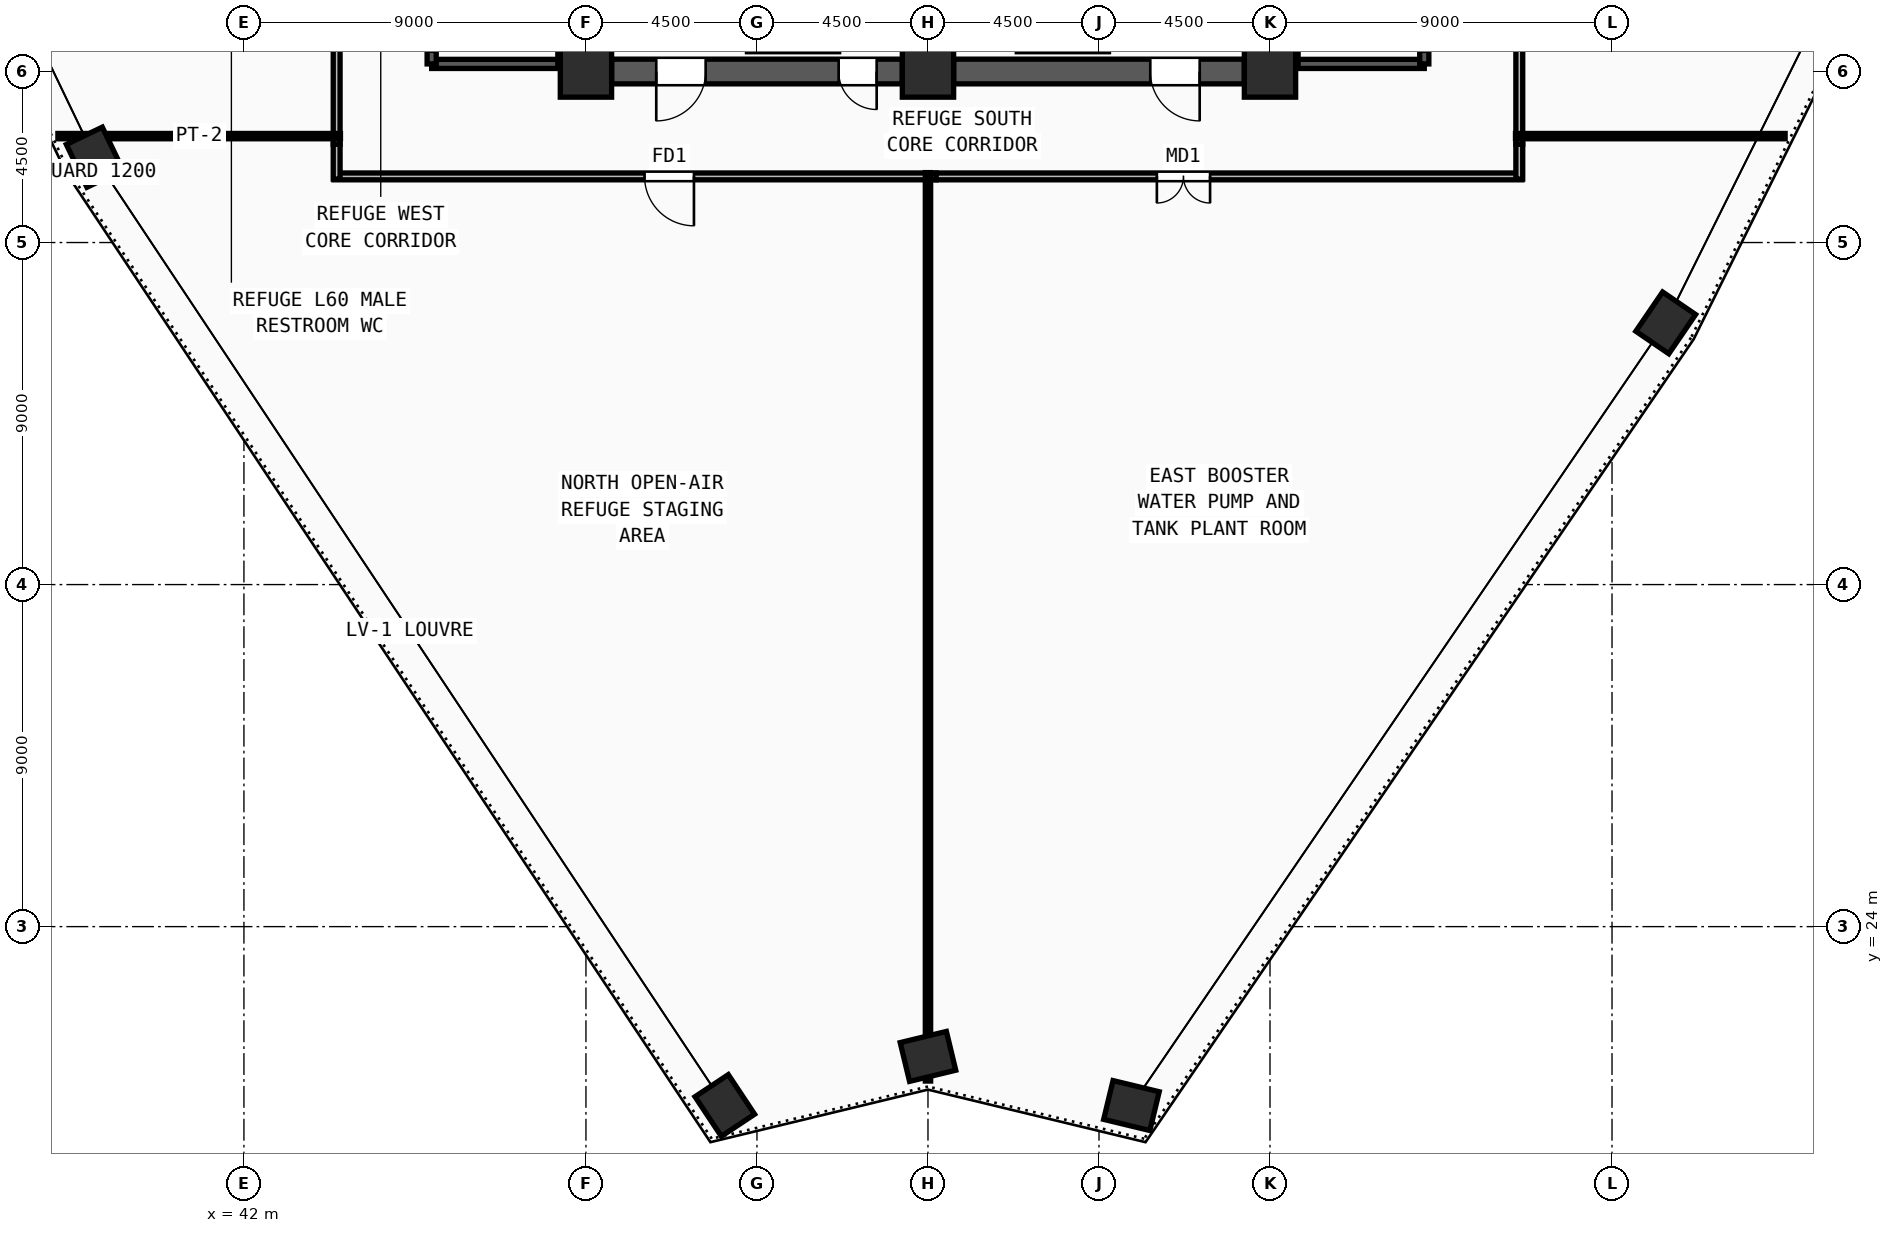
"""IFC4 building model, lengths in metres.
Left out: names, types, materials, properties, quantities, classifications, styles, units other than length and angle.
Written with IfcOpenShell. Run it as: python <this file> out.ifc"""

import sys

from ifc_helpers import new_model, si_unit, direction, frame, frame_2d, origin, origin_2d, place, context, subcontext, project, spatial, rectangle, extrude, source, transform, mapped, element, fill, save


model = new_model("IFC4")
c1 = context("Model", 3, precision=1e-05, world=origin(), true_north=direction((0.0, 1.0)))
c2 = subcontext(c1, "Body", "Model", "MODEL_VIEW")
j1 = project(units=[si_unit("LENGTHUNIT", "METRE"), si_unit("PLANEANGLEUNIT", "RADIAN")], contexts=[c1])
p1 = place(None, origin())
s1 = spatial("IfcSite", under=j1, at=p1, CompositionType="ELEMENT")
p2 = place(p1, origin())
s2 = spatial("IfcBuilding", under=s1, at=p2, CompositionType="ELEMENT")
p3 = place(p2, frame((0.0, 0.0, 231.75)))
s3 = spatial("IfcBuildingStorey", under=s2, at=p3, CompositionType="ELEMENT", Elevation=231.75)
m1 = source(origin(), c2, "Body", "SweptSolid", [
    extrude(rectangle(XDim=1.35, YDim=1.35, at=origin_2d()), origin(), (0.0, 0.0, 1.0), 4.5),
])
for number, where, z_axis, x_axis in (
    (1, (51.0, 46.5, 0.0), (0.0, 0.0, 1.0), (1.0, 0.0, 0.0)),
    (2, (60.0, 46.5, 0.0), (0.0, 0.0, 1.0), (1.0, 0.0, 0.0)),
    (3, (69.0, 46.5, 0.0), (0.0, 0.0, 1.0), (1.0, 0.0, 0.0)),
):
    element("IfcColumn", number, at=place(p3, frame(where, z_axis=z_axis, x_axis=x_axis)), inside=s3, PredefinedType="COLUMN", context=c2, shape_type="MappedRepresentation", body=[
        mapped(m1, transform((0.0, 0.0, 0.0), x_axis=(1.0, 0.0, 0.0), y_axis=(0.0, 1.0, 0.0), z_axis=(0.0, 0.0, 1.0), scale=1.0)),
    ])
m2 = source(origin(), c2, "Body", "SweptSolid", [
    extrude(rectangle(XDim=1.25, YDim=1.05, at=origin_2d()), origin(), (0.0, 0.0, 1.0), 4.5),
])
for number, where, z_axis, x_axis in (
    (4, (54.654, 19.294, 0.0), (0.0, 0.0, 1.0), (-0.554, 0.833, 0.0)),
    (5, (38.071, 44.245, 0.0), (0.0, 0.0, 1.0), (-0.433, 0.901, 0.0)),
    (6, (79.413, 39.886, 0.0), (0.0, 0.0, 1.0), (0.564, 0.826, 0.0)),
    (7, (65.354, 19.292, 0.0), (0.0, 0.0, 1.0), (-0.972, 0.235, 0.0)),
    (8, (60.0, 20.585, 0.0), (0.0, 0.0, 1.0), (0.972, 0.235, 0.0)),
):
    element("IfcColumn", number, at=place(p3, frame(where, z_axis=z_axis, x_axis=x_axis)), inside=s3, PredefinedType="COLUMN", context=c2, shape_type="MappedRepresentation", body=[
        mapped(m2, transform((0.0, 0.0, 0.0), x_axis=(1.0, 0.0, 0.0), y_axis=(0.0, 1.0, 0.0), z_axis=(0.0, 0.0, 1.0), scale=1.0)),
    ])
p4 = place(p3, frame((68.325, 46.5, 0.0), z_axis=(0.0, 0.0, 1.0), x_axis=(-1.0, 0.0, 0.0)))
e9 = element("IfcWall", 9, at=p4, inside=s3, PredefinedType="SHEAR", context=c2, shape_type="SweptSolid", body=[
    extrude(rectangle(XDim=7.65, YDim=0.65, at=frame_2d((3.825, 0.0))), origin(), (0.0, 0.0, 1.0), 4.32),
])
m3 = source(origin(), c2, "Body", "SweptSolid", [
    extrude(rectangle(XDim=1.3, YDim=2.2, at=frame_2d((0.65, 1.1))), frame((0.0, 0.335, 0.0), z_axis=(0.0, -1.0, 0.0), x_axis=(1.0, 0.0, 0.0)), (0.0, 0.0, 1.0), 0.67),
])
p5 = place(p4, frame((1.175, 0.0, 0.0)))
e10 = element("IfcOpeningElement", 10, at=p5, cuts=e9, PredefinedType="OPENING", context=c2, shape_type="MappedRepresentation", body=[
    mapped(m3, transform((0.0, 0.0, 0.0), x_axis=(1.0, 0.0, 0.0), y_axis=(0.0, 1.0, 0.0), z_axis=(0.0, 0.0, 1.0), scale=1.0)),
])
p6 = place(p3, frame((59.325, 46.5, 0.0), z_axis=(0.0, 0.0, 1.0), x_axis=(-1.0, 0.0, 0.0)))
e11 = element("IfcWall", 11, at=p6, inside=s3, PredefinedType="SHEAR", context=c2, shape_type="SweptSolid", body=[
    extrude(rectangle(XDim=7.65, YDim=0.65, at=frame_2d((3.825, 0.0))), origin(), (0.0, 0.0, 1.0), 4.32),
])
p7 = place(p6, frame((5.175, 0.0, 0.0)))
e12 = element("IfcOpeningElement", 12, at=p7, cuts=e11, PredefinedType="OPENING", context=c2, shape_type="MappedRepresentation", body=[
    mapped(m3, transform((0.0, 0.0, 0.0), x_axis=(1.0, 0.0, 0.0), y_axis=(0.0, 1.0, 0.0), z_axis=(0.0, 0.0, 1.0), scale=1.0)),
])
m4 = source(origin(), c2, "Body", "SweptSolid", [
    extrude(rectangle(XDim=1.0, YDim=2.2, at=frame_2d((0.5, 1.1))), frame((0.0, 0.335, 0.0), z_axis=(0.0, -1.0, 0.0), x_axis=(1.0, 0.0, 0.0)), (0.0, 0.0, 1.0), 0.67),
])
p8 = place(p6, frame((0.675, 0.0, 0.0)))
e13 = element("IfcOpeningElement", 13, at=p8, cuts=e11, PredefinedType="OPENING", context=c2, shape_type="MappedRepresentation", body=[
    mapped(m4, transform((0.0, 0.0, 0.0), x_axis=(1.0, 0.0, 0.0), y_axis=(0.0, 1.0, 0.0), z_axis=(0.0, 0.0, 1.0), scale=1.0)),
])
p9 = place(p3, frame((46.94, 46.7, 0.0), z_axis=(0.0, 0.0, 1.0), x_axis=(1.0, 0.0, 0.0)))
e14 = element("IfcWall", 14, at=p9, inside=s3, PredefinedType="SOLIDWALL", context=c2, shape_type="SweptSolid", body=[
    extrude(rectangle(XDim=3.44, YDim=0.24, at=frame_2d((1.72, 0.0))), origin(), (0.0, 0.0, 1.0), 4.32),
])
p10 = place(p3, frame((50.38, 46.7, 0.0), z_axis=(0.0, 0.0, 1.0), x_axis=(0.0, 1.0, 0.0)))
e15 = element("IfcWall", 15, at=p10, inside=s3, PredefinedType="SOLIDWALL", context=c2, shape_type="SweptSolid", body=[
    extrude(rectangle(XDim=7.82, YDim=0.24, at=frame_2d((3.91, 0.0))), origin(), (0.0, 0.0, 1.0), 4.32),
])
p11 = place(p3, frame((46.94, 54.52, 0.0), z_axis=(0.0, 0.0, 1.0), x_axis=(0.0, -1.0, 0.0)))
e16 = element("IfcWall", 16, at=p11, inside=s3, PredefinedType="SOLIDWALL", context=c2, shape_type="SweptSolid", body=[
    extrude(rectangle(XDim=7.82, YDim=0.24, at=frame_2d((3.91, 0.0))), origin(), (0.0, 0.0, 1.0), 4.32),
])
m5 = source(origin(), c2, "Body", "SweptSolid", [
    extrude(rectangle(XDim=1.2, YDim=2.2, at=frame_2d((0.6, 1.1))), frame((0.0, 0.13, 0.0), z_axis=(0.0, -1.0, 0.0), x_axis=(1.0, 0.0, 0.0)), (0.0, 0.0, 1.0), 0.26),
])
p12 = place(p11, frame((6.3, 0.0, 0.0)))
e17 = element("IfcOpeningElement", 17, at=p12, cuts=e16, PredefinedType="OPENING", context=c2, shape_type="MappedRepresentation", body=[
    mapped(m5, transform((0.0, 0.0, 0.0), x_axis=(1.0, 0.0, 0.0), y_axis=(0.0, 1.0, 0.0), z_axis=(0.0, 0.0, 1.0), scale=1.0)),
])
p13 = place(p3, frame((69.62, 46.7, 0.0), z_axis=(0.0, 0.0, 1.0), x_axis=(1.0, 0.0, 0.0)))
e18 = element("IfcWall", 18, at=p13, inside=s3, PredefinedType="SOLIDWALL", context=c2, shape_type="SweptSolid", body=[
    extrude(rectangle(XDim=3.44, YDim=0.24, at=frame_2d((1.72, 0.0))), origin(), (0.0, 0.0, 1.0), 4.32),
])
p14 = place(p3, frame((73.06, 46.7, 0.0), z_axis=(0.0, 0.0, 1.0), x_axis=(0.0, 1.0, 0.0)))
e19 = element("IfcWall", 19, at=p14, inside=s3, PredefinedType="SOLIDWALL", context=c2, shape_type="SweptSolid", body=[
    extrude(rectangle(XDim=7.82, YDim=0.24, at=frame_2d((3.91, 0.0))), origin(), (0.0, 0.0, 1.0), 4.32),
])
p15 = place(p14, frame((0.32, 0.0, 0.0)))
e20 = element("IfcOpeningElement", 20, at=p15, cuts=e19, PredefinedType="OPENING", context=c2, shape_type="MappedRepresentation", body=[
    mapped(m5, transform((0.0, 0.0, 0.0), x_axis=(1.0, 0.0, 0.0), y_axis=(0.0, 1.0, 0.0), z_axis=(0.0, 0.0, 1.0), scale=1.0)),
])
p16 = place(p3, frame((69.62, 54.52, 0.0), z_axis=(0.0, 0.0, 1.0), x_axis=(0.0, -1.0, 0.0)))
e21 = element("IfcWall", 21, at=p16, inside=s3, PredefinedType="SOLIDWALL", context=c2, shape_type="SweptSolid", body=[
    extrude(rectangle(XDim=7.82, YDim=0.24, at=frame_2d((3.91, 0.0))), origin(), (0.0, 0.0, 1.0), 4.32),
])
p17 = place(p3, frame((75.56, 67.015, 0.0), z_axis=(0.0, 0.0, 1.0), x_axis=(0.0, -1.0, 0.0)))
e22 = element("IfcWall", 22, at=p17, inside=s3, PredefinedType="PARTITIONING", context=c2, shape_type="SweptSolid", body=[
    extrude(rectangle(XDim=22.43, YDim=0.18, at=frame_2d((11.215, 0.0))), origin(), (0.0, 0.0, 1.0), 4.32),
])
m6 = source(origin(), c2, "Body", "SweptSolid", [
    extrude(rectangle(XDim=1.3, YDim=2.2, at=frame_2d((0.65, 1.1))), frame((0.0, 0.1, 0.0), z_axis=(0.0, -1.0, 0.0), x_axis=(1.0, 0.0, 0.0)), (0.0, 0.0, 1.0), 0.2),
])
p18 = place(p17, frame((10.565, 0.0, 0.0)))
e23 = element("IfcOpeningElement", 23, at=p18, cuts=e22, PredefinedType="OPENING", context=c2, shape_type="MappedRepresentation", body=[
    mapped(m6, transform((0.0, 0.0, 0.0), x_axis=(1.0, 0.0, 0.0), y_axis=(0.0, 1.0, 0.0), z_axis=(0.0, 0.0, 1.0), scale=1.0)),
])
p19 = place(p3, frame((60.215, 43.74, 0.0), z_axis=(0.0, 0.0, 1.0), x_axis=(-1.0, 0.0, 0.0)))
e24 = element("IfcWall", 24, at=p19, inside=s3, PredefinedType="PARTITIONING", context=c2, shape_type="SweptSolid", body=[
    extrude(rectangle(XDim=15.845, YDim=0.18, at=frame_2d((7.922, 0.0))), origin(), (0.0, 0.0, 1.0), 4.32),
])
p20 = place(p19, frame((6.373, 0.0, 0.0)))
e25 = element("IfcOpeningElement", 25, at=p20, cuts=e24, PredefinedType="OPENING", context=c2, shape_type="MappedRepresentation", body=[
    mapped(m6, transform((0.0, 0.0, 0.0), x_axis=(1.0, 0.0, 0.0), y_axis=(0.0, 1.0, 0.0), z_axis=(0.0, 0.0, 1.0), scale=1.0)),
])
p21 = place(p3, frame((75.63, 43.74, 0.0), z_axis=(0.0, 0.0, 1.0), x_axis=(-1.0, 0.0, 0.0)))
e26 = element("IfcWall", 26, at=p21, inside=s3, PredefinedType="PARTITIONING", context=c2, shape_type="SweptSolid", body=[
    extrude(rectangle(XDim=15.415, YDim=0.18, at=frame_2d((7.708, 0.0))), origin(), (0.0, 0.0, 1.0), 4.32),
])
m7 = source(origin(), c2, "Body", "SweptSolid", [
    extrude(rectangle(XDim=1.4, YDim=2.25, at=frame_2d((0.7, 1.125))), frame((0.0, 0.1, 0.0), z_axis=(0.0, -1.0, 0.0), x_axis=(1.0, 0.0, 0.0)), (0.0, 0.0, 1.0), 0.2),
])
p22 = place(p21, frame((8.207, 0.0, 0.0)))
e27 = element("IfcOpeningElement", 27, at=p22, cuts=e26, PredefinedType="OPENING", context=c2, shape_type="MappedRepresentation", body=[
    mapped(m7, transform((0.0, 0.0, 0.0), x_axis=(1.0, 0.0, 0.0), y_axis=(0.0, 1.0, 0.0), z_axis=(0.0, 0.0, 1.0), scale=1.0)),
])
p23 = place(p3, frame((44.44, 44.585, 0.0), z_axis=(0.0, 0.0, 1.0), x_axis=(0.0, 1.0, 0.0)))
e28 = element("IfcWall", 28, at=p23, inside=s3, PredefinedType="PARTITIONING", context=c2, shape_type="SweptSolid", body=[
    extrude(rectangle(XDim=2.755, YDim=0.18, at=frame_2d((1.377, 0.0))), origin(), (0.0, 0.0, 1.0), 4.32),
])
for number, where, z_axis, x_axis in (
    (29, (44.44, 43.67, 0.0), (0.0, 0.0, 1.0), (0.0, 1.0, 0.0)),
    (30, (75.56, 44.585, 0.0), (0.0, 0.0, 1.0), (0.0, -1.0, 0.0)),
):
    element("IfcWall", number, at=place(p3, frame(where, z_axis=z_axis, x_axis=x_axis)), inside=s3, PredefinedType="PARTITIONING", context=c2, shape_type="SweptSolid", body=[
        extrude(rectangle(XDim=0.915, YDim=0.18, at=frame_2d((0.458, 0.0))), origin(), (0.0, 0.0, 1.0), 4.32),
    ])
p24 = place(p3, frame((44.54, 44.8, 0.0), z_axis=(0.0, 0.0, 1.0), x_axis=(-1.0, 0.0, 0.0)))
e31 = element("IfcWall", 31, at=p24, inside=s3, PredefinedType="PARTITIONING", context=c2, shape_type="SweptSolid", body=[
    extrude(rectangle(XDim=7.435, YDim=0.14, at=frame_2d((3.718, 0.0))), origin(), (0.0, 0.0, 1.0), 4.32),
])
p25 = place(p3, frame((75.46, 44.8, 0.0), z_axis=(0.0, 0.0, 1.0), x_axis=(1.0, 0.0, 0.0)))
e32 = element("IfcWall", 32, at=p25, inside=s3, PredefinedType="PARTITIONING", context=c2, shape_type="SweptSolid", body=[
    extrude(rectangle(XDim=7.095, YDim=0.14, at=frame_2d((3.547, 0.0))), origin(), (0.0, 0.0, 1.0), 4.32),
])
p26 = place(p3, frame((60.0, 43.84, 0.0), z_axis=(0.0, 0.0, 1.0), x_axis=(0.0, -1.0, 0.0)))
e33 = element("IfcWall", 33, at=p26, inside=s3, PredefinedType="PARTITIONING", context=c2, shape_type="SweptSolid", body=[
    extrude(rectangle(XDim=23.903, YDim=0.14, at=frame_2d((11.952, 0.0))), origin(), (0.0, 0.0, 1.0), 4.32),
])
m8 = source(origin(), c2, "Body", "SweptSolid", [
    extrude(rectangle(XDim=1.3, YDim=2.2, at=frame_2d((0.65, 1.1))), frame((0.0, 0.025, 0.0), z_axis=(0.0, -1.0, 0.0), x_axis=(1.0, 0.0, 0.0)), (0.0, 0.0, 1.0), 0.05),
])
p27 = place(p7, origin())
e34 = element("IfcDoor", 34, at=p27, inside=s3, OperationType="SINGLE_SWING_RIGHT", PredefinedType="DOOR", context=c2, shape_type="MappedRepresentation", body=[
    mapped(m8, transform((0.0, 0.0, 0.0), x_axis=(1.0, 0.0, 0.0), y_axis=(0.0, 1.0, 0.0), z_axis=(0.0, 0.0, 1.0), scale=1.0)),
])
fill(e12, e34)
m9 = source(origin(), c2, "Body", "SweptSolid", [
    extrude(rectangle(XDim=1.0, YDim=2.2, at=frame_2d((0.5, 1.1))), frame((0.0, 0.025, 0.0), z_axis=(0.0, -1.0, 0.0), x_axis=(1.0, 0.0, 0.0)), (0.0, 0.0, 1.0), 0.05),
])
p28 = place(p8, origin())
e35 = element("IfcDoor", 35, at=p28, inside=s3, OperationType="SINGLE_SWING_LEFT", PredefinedType="DOOR", context=c2, shape_type="MappedRepresentation", body=[
    mapped(m9, transform((0.0, 0.0, 0.0), x_axis=(1.0, 0.0, 0.0), y_axis=(0.0, 1.0, 0.0), z_axis=(0.0, 0.0, 1.0), scale=1.0)),
])
fill(e13, e35)
p29 = place(p5, origin())
e36 = element("IfcDoor", 36, at=p29, inside=s3, OperationType="SINGLE_SWING_LEFT", PredefinedType="DOOR", context=c2, shape_type="MappedRepresentation", body=[
    mapped(m8, transform((0.0, 0.0, 0.0), x_axis=(1.0, 0.0, 0.0), y_axis=(0.0, 1.0, 0.0), z_axis=(0.0, 0.0, 1.0), scale=1.0)),
])
fill(e10, e36)
p30 = place(p20, origin())
e37 = element("IfcDoor", 37, at=p30, inside=s3, OperationType="SINGLE_SWING_LEFT", PredefinedType="DOOR", context=c2, shape_type="MappedRepresentation", body=[
    mapped(m8, transform((0.0, 0.0, 0.0), x_axis=(1.0, 0.0, 0.0), y_axis=(0.0, 1.0, 0.0), z_axis=(0.0, 0.0, 1.0), scale=1.0)),
])
fill(e25, e37)
m10 = source(origin(), c2, "Body", "SweptSolid", [
    extrude(rectangle(XDim=1.4, YDim=2.25, at=frame_2d((0.7, 1.125))), frame((0.0, 0.025, 0.0), z_axis=(0.0, -1.0, 0.0), x_axis=(1.0, 0.0, 0.0)), (0.0, 0.0, 1.0), 0.05),
])
p31 = place(p22, origin())
e38 = element("IfcDoor", 38, at=p31, inside=s3, OperationType="DOUBLE_DOOR_SINGLE_SWING", PredefinedType="DOOR", context=c2, shape_type="MappedRepresentation", body=[
    mapped(m10, transform((0.0, 0.0, 0.0), x_axis=(1.0, 0.0, 0.0), y_axis=(0.0, 1.0, 0.0), z_axis=(0.0, 0.0, 1.0), scale=1.0)),
])
fill(e27, e38)
save(model, sys.argv[1])
